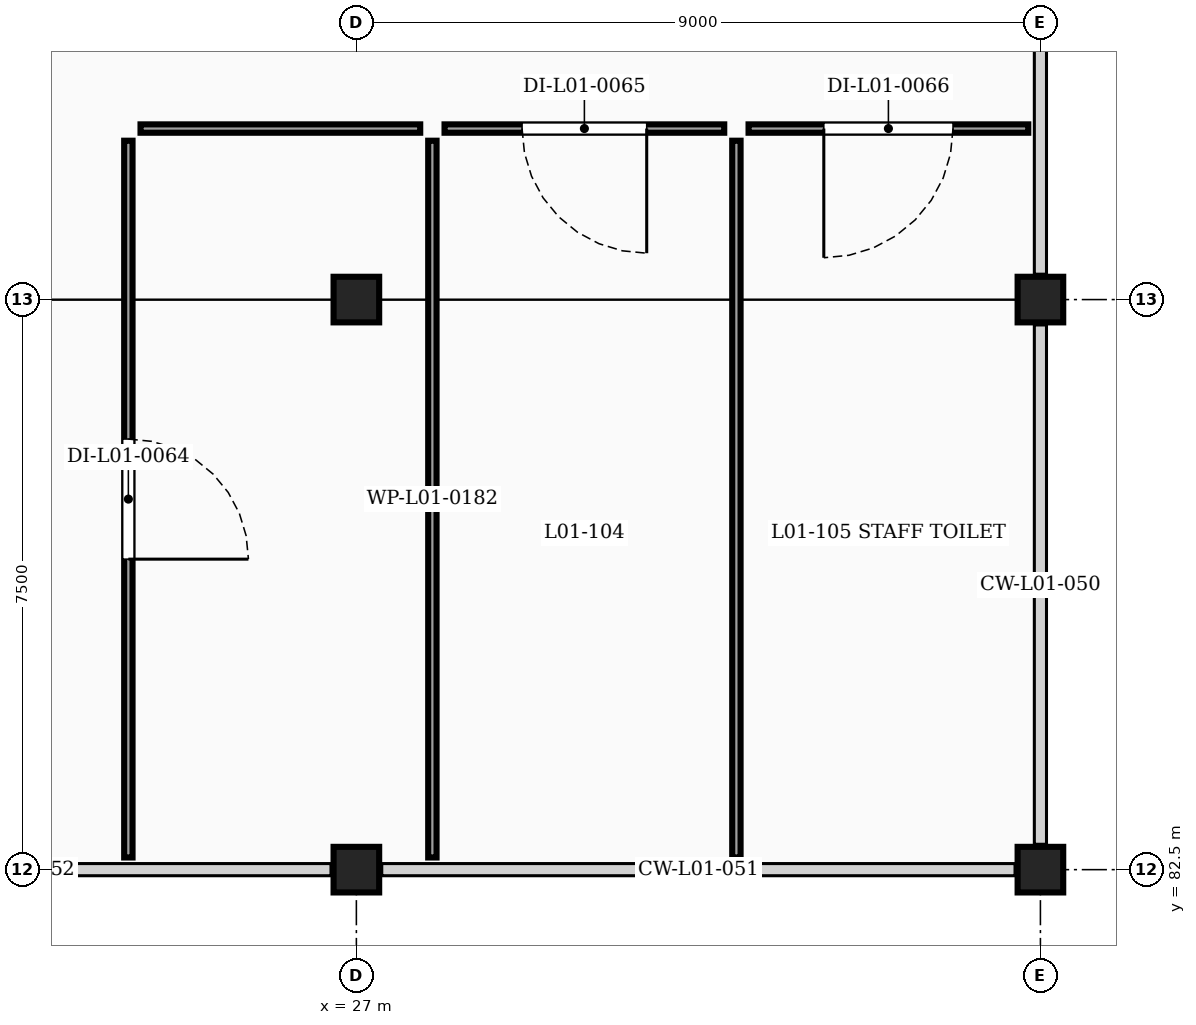
"""IFC4 building model, lengths in metres.
Left out: names, types, materials, properties, quantities, classifications, styles, units other than length and angle.
Written with IfcOpenShell. Run it as: python <this file> out.ifc"""

import sys

from ifc_helpers import new_model, si_unit, direction, frame, frame_2d, origin, origin_2d, place, context, subcontext, project, spatial, rectangle, extrude, element, fill, save


model = new_model("IFC4")
c1 = context("Model", 3, precision=1e-05, world=origin(), true_north=direction((0.0, 1.0)))
c2 = subcontext(c1, "Body", "Model", "MODEL_VIEW")
j1 = project(units=[si_unit("LENGTHUNIT", "METRE"), si_unit("PLANEANGLEUNIT", "RADIAN")], contexts=[c1])
p1 = place(None, origin())
s1 = spatial("IfcSite", under=j1, at=p1, CompositionType="ELEMENT")
p2 = place(p1, origin())
s2 = spatial("IfcBuilding", under=s1, at=p2, CompositionType="ELEMENT")
p3 = place(p2, frame((0.0, 0.0, 4.5)))
s3 = spatial("IfcBuildingStorey", under=s2, at=p3, CompositionType="ELEMENT", Elevation=4.5)
for number, where, z_axis, x_axis in (
    (1, (27.0, 82.5, 0.0), (0.0, 0.0, 1.0), (1.0, 0.0, 0.0)),
    (2, (36.0, 82.5, 0.0), (0.0, 0.0, 1.0), (1.0, 0.0, 0.0)),
    (3, (27.0, 90.0, 0.0), (0.0, 0.0, 1.0), (1.0, 0.0, 0.0)),
    (4, (36.0, 90.0, 0.0), (0.0, 0.0, 1.0), (1.0, 0.0, 0.0)),
):
    element("IfcColumn", number, at=place(p3, frame(where, z_axis=z_axis, x_axis=x_axis)), inside=s3, PredefinedType="COLUMN", context=c2, shape_type="SweptSolid", body=[
        extrude(rectangle(XDim=0.6, YDim=0.6, at=origin_2d()), origin(), (0.0, 0.0, 1.0), 4.0),
    ])
p4 = place(p3, frame((28.0, 82.66, 0.0), z_axis=(0.0, 0.0, 1.0), x_axis=(0.0, 1.0, 0.0)))
e5 = element("IfcWall", 5, at=p4, inside=s3, PredefinedType="PARTITIONING", context=c2, shape_type="SweptSolid", body=[
    extrude(rectangle(XDim=9.43, YDim=0.11, at=frame_2d((4.715, 0.0))), origin(), (0.0, 0.0, 1.0), 3.76),
])
p5 = place(p3, frame((24.0, 92.09, 0.0), z_axis=(0.0, 0.0, 1.0), x_axis=(0.0, -1.0, 0.0)))
e6 = element("IfcWall", 6, at=p5, inside=s3, PredefinedType="PARTITIONING", context=c2, shape_type="SweptSolid", body=[
    extrude(rectangle(XDim=9.43, YDim=0.11, at=frame_2d((4.715, 0.0))), origin(), (0.0, 0.0, 1.0), 3.302),
])
p6 = place(p5, frame((3.925, 0.0, 0.0)))
e7 = element("IfcOpeningElement", 7, at=p6, cuts=e6, PredefinedType="OPENING", context=c2, shape_type="SweptSolid", body=[
    extrude(rectangle(XDim=1.58, YDim=2.2, at=frame_2d((0.79, 1.1))), frame((0.0, 0.065, 0.0), z_axis=(0.0, -1.0, 0.0), x_axis=(1.0, 0.0, 0.0)), (0.0, 0.0, 1.0), 0.13),
])
p7 = place(p3, frame((27.84, 92.25, 0.0), z_axis=(0.0, 0.0, 1.0), x_axis=(-1.0, 0.0, 0.0)))
e8 = element("IfcWall", 8, at=p7, inside=s3, PredefinedType="PARTITIONING", context=c2, shape_type="SweptSolid", body=[
    extrude(rectangle(XDim=3.68, YDim=0.11, at=frame_2d((1.84, 0.0))), origin(), (0.0, 0.0, 1.0), 3.76),
])
p8 = place(p3, frame((32.0, 82.66, 0.0), z_axis=(0.0, 0.0, 1.0), x_axis=(0.0, 1.0, 0.0)))
e9 = element("IfcWall", 9, at=p8, inside=s3, PredefinedType="PARTITIONING", context=c2, shape_type="SweptSolid", body=[
    extrude(rectangle(XDim=9.43, YDim=0.11, at=frame_2d((4.715, 0.0))), origin(), (0.0, 0.0, 1.0), 3.76),
])
p9 = place(p3, frame((31.84, 92.25, 0.0), z_axis=(0.0, 0.0, 1.0), x_axis=(-1.0, 0.0, 0.0)))
e10 = element("IfcWall", 10, at=p9, inside=s3, PredefinedType="PARTITIONING", context=c2, shape_type="SweptSolid", body=[
    extrude(rectangle(XDim=3.68, YDim=0.11, at=frame_2d((1.84, 0.0))), origin(), (0.0, 0.0, 1.0), 3.76),
])
p10 = place(p9, frame((1.02, 0.0, 0.0)))
e11 = element("IfcOpeningElement", 11, at=p10, cuts=e10, PredefinedType="OPENING", context=c2, shape_type="SweptSolid", body=[
    extrude(rectangle(XDim=1.64, YDim=2.2, at=frame_2d((0.82, 1.1))), frame((0.0, 0.065, 0.0), z_axis=(0.0, -1.0, 0.0), x_axis=(1.0, 0.0, 0.0)), (0.0, 0.0, 1.0), 0.13),
])
p11 = place(p3, frame((35.84, 92.25, 0.0), z_axis=(0.0, 0.0, 1.0), x_axis=(-1.0, 0.0, 0.0)))
e12 = element("IfcWall", 12, at=p11, inside=s3, PredefinedType="PARTITIONING", context=c2, shape_type="SweptSolid", body=[
    extrude(rectangle(XDim=3.68, YDim=0.11, at=frame_2d((1.84, 0.0))), origin(), (0.0, 0.0, 1.0), 3.76),
])
p12 = place(p11, frame((0.99, 0.0, 0.0)))
e13 = element("IfcOpeningElement", 13, at=p12, cuts=e12, PredefinedType="OPENING", context=c2, shape_type="SweptSolid", body=[
    extrude(rectangle(XDim=1.7, YDim=2.22, at=frame_2d((0.85, 1.11))), frame((0.0, 0.065, 0.0), z_axis=(0.0, -1.0, 0.0), x_axis=(1.0, 0.0, 0.0)), (0.0, 0.0, 1.0), 0.13),
])
p13 = place(p6, origin())
e14 = element("IfcDoor", 14, at=p13, inside=s3, OperationType="SINGLE_SWING_RIGHT", PredefinedType="DOOR", context=c2, shape_type="SweptSolid", body=[
    extrude(rectangle(XDim=1.58, YDim=2.2, at=frame_2d((0.79, 1.1))), frame((0.0, 0.025, 0.0), z_axis=(0.0, -1.0, 0.0), x_axis=(1.0, 0.0, 0.0)), (0.0, 0.0, 1.0), 0.05),
])
fill(e7, e14)
p14 = place(p10, origin())
e15 = element("IfcDoor", 15, at=p14, inside=s3, OperationType="SINGLE_SWING_LEFT", PredefinedType="DOOR", context=c2, shape_type="SweptSolid", body=[
    extrude(rectangle(XDim=1.64, YDim=2.2, at=frame_2d((0.82, 1.1))), frame((0.0, 0.025, 0.0), z_axis=(0.0, -1.0, 0.0), x_axis=(1.0, 0.0, 0.0)), (0.0, 0.0, 1.0), 0.05),
])
fill(e11, e15)
p15 = place(p12, origin())
e16 = element("IfcDoor", 16, at=p15, inside=s3, OperationType="SINGLE_SWING_RIGHT", PredefinedType="DOOR", context=c2, shape_type="SweptSolid", body=[
    extrude(rectangle(XDim=1.7, YDim=2.22, at=frame_2d((0.85, 1.11))), frame((0.0, 0.025, 0.0), z_axis=(0.0, -1.0, 0.0), x_axis=(1.0, 0.0, 0.0)), (0.0, 0.0, 1.0), 0.05),
])
fill(e13, e16)
save(model, sys.argv[1])
